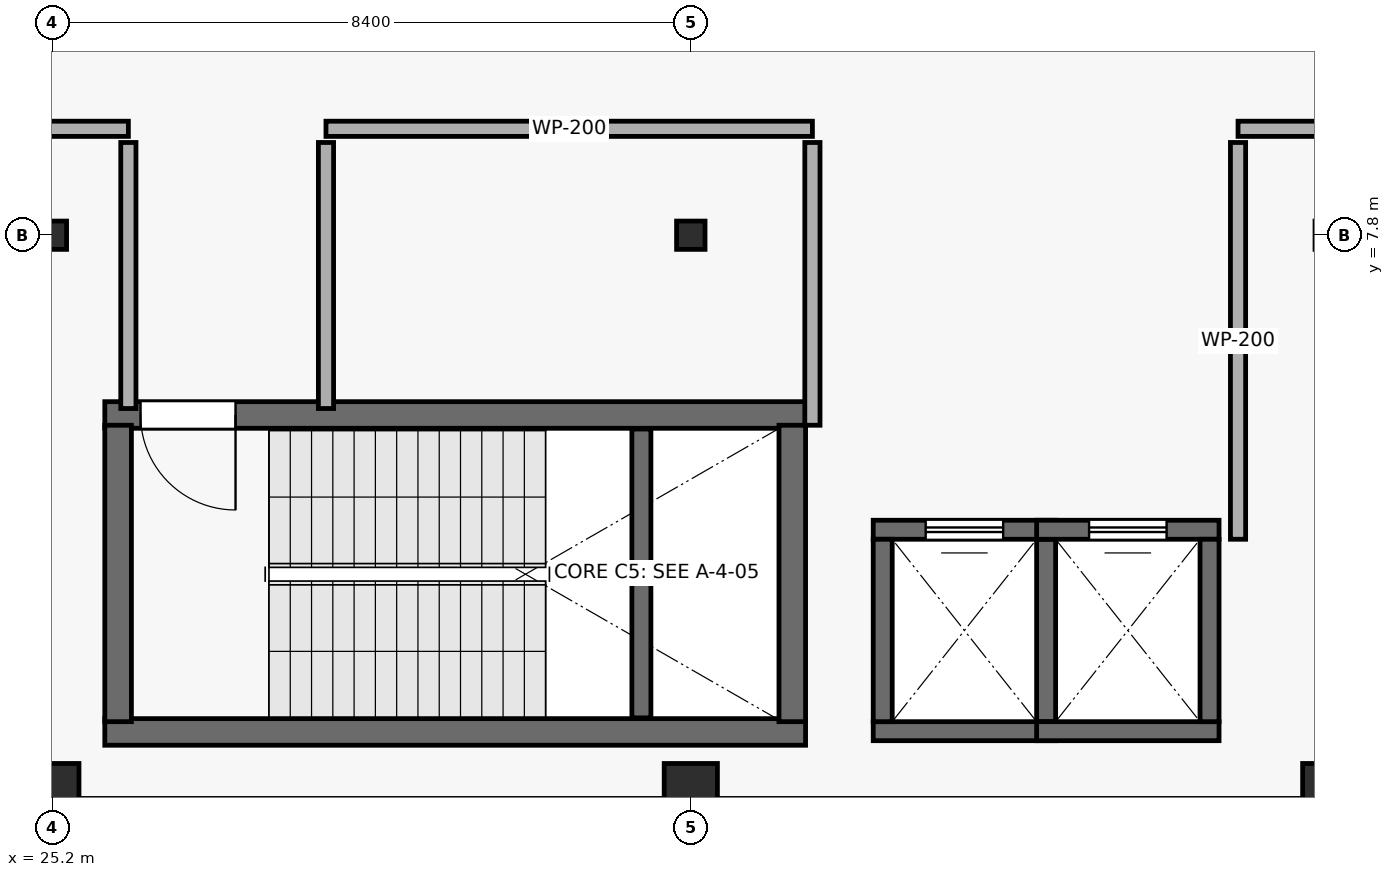
"""IFC4 building model, lengths in metres.
Left out: names, types, materials, properties, quantities, classifications, styles, units other than length and angle.
Written with IfcOpenShell. Run it as: python <this file> out.ifc"""

import sys

from ifc_helpers import new_model, si_unit, direction, frame, frame_2d, origin, origin_2d, place, context, subcontext, project, spatial, rectangle, i_section, extrude, element, fill, save


model = new_model("IFC4")
c1 = context("Model", 3, precision=1e-05, world=origin(), true_north=direction((0.0, 1.0)))
c2 = subcontext(c1, "Body", "Model", "MODEL_VIEW")
j1 = project(units=[si_unit("LENGTHUNIT", "METRE"), si_unit("PLANEANGLEUNIT", "RADIAN")], contexts=[c1])
p1 = place(None, origin())
s1 = spatial("IfcSite", under=j1, at=p1, CompositionType="ELEMENT")
p2 = place(p1, origin())
s2 = spatial("IfcBuilding", under=s1, at=p2, CompositionType="ELEMENT")
p3 = place(p2, frame((0.0, 0.0, 10.2)))
s3 = spatial("IfcBuildingStorey", under=s2, at=p3, CompositionType="ELEMENT", Elevation=10.2)
p4 = place(p3, frame((25.2, 0.5, 0.0), z_axis=(0.0, 0.0, 1.0), x_axis=(1.0, 0.0, 0.0)))
e1 = element("IfcColumn", 1, at=p4, inside=s3, PredefinedType="COLUMN", context=c2, shape_type="SweptSolid", body=[
    extrude(rectangle(XDim=0.7, YDim=0.7, at=origin_2d()), origin(), (0.0, 0.0, 1.0), 5.1),
])
p5 = place(p3, frame((25.2, 7.8, 0.0), z_axis=(0.0, 0.0, 1.0), x_axis=(1.0, 0.0, 0.0)))
e2 = element("IfcColumn", 2, at=p5, inside=s3, PredefinedType="COLUMN", context=c2, shape_type="SweptSolid", body=[
    extrude(i_section(OverallWidth=0.374, OverallDepth=0.372, WebThickness=0.016, FlangeThickness=0.026, at=origin_2d()), origin(), (0.0, 0.0, 1.0), 5.1),
])
p6 = place(p3, frame((33.6, 0.5, 0.0), z_axis=(0.0, 0.0, 1.0), x_axis=(1.0, 0.0, 0.0)))
e3 = element("IfcColumn", 3, at=p6, inside=s3, PredefinedType="COLUMN", context=c2, shape_type="SweptSolid", body=[
    extrude(rectangle(XDim=0.7, YDim=0.7, at=origin_2d()), origin(), (0.0, 0.0, 1.0), 5.1),
])
p7 = place(p3, frame((33.6, 7.8, 0.0), z_axis=(0.0, 0.0, 1.0), x_axis=(1.0, 0.0, 0.0)))
e4 = element("IfcColumn", 4, at=p7, inside=s3, PredefinedType="COLUMN", context=c2, shape_type="SweptSolid", body=[
    extrude(i_section(OverallWidth=0.374, OverallDepth=0.372, WebThickness=0.016, FlangeThickness=0.026, at=origin_2d()), origin(), (0.0, 0.0, 1.0), 5.1),
])
p8 = place(p3, frame((42.0, 0.5, 0.0), z_axis=(0.0, 0.0, 1.0), x_axis=(1.0, 0.0, 0.0)))
e5 = element("IfcColumn", 5, at=p8, inside=s3, PredefinedType="COLUMN", context=c2, shape_type="SweptSolid", body=[
    extrude(rectangle(XDim=0.7, YDim=0.7, at=origin_2d()), origin(), (0.0, 0.0, 1.0), 5.1),
])
p9 = place(p3, frame((25.89, 1.265, 0.0), z_axis=(0.0, 0.0, 1.0), x_axis=(1.0, 0.0, 0.0)))
e6 = element("IfcWall", 6, at=p9, inside=s3, PredefinedType="SHEAR", context=c2, shape_type="SweptSolid", body=[
    extrude(rectangle(XDim=9.22, YDim=0.35, at=frame_2d((4.61, 0.0))), origin(), (0.0, 0.0, 1.0), 4.82),
])
p10 = place(p3, frame((35.11, 5.435, 0.0), z_axis=(0.0, 0.0, 1.0), x_axis=(-1.0, 0.0, 0.0)))
e7 = element("IfcWall", 7, at=p10, inside=s3, PredefinedType="SHEAR", context=c2, shape_type="SweptSolid", body=[
    extrude(rectangle(XDim=9.22, YDim=0.35, at=frame_2d((4.61, 0.0))), origin(), (0.0, 0.0, 1.0), 4.82),
])
p11 = place(p10, frame((7.5, 0.0, 0.0)))
e8 = element("IfcOpeningElement", 8, at=p11, cuts=e7, PredefinedType="OPENING", context=c2, shape_type="SweptSolid", body=[
    extrude(rectangle(XDim=1.25, YDim=2.2, at=frame_2d((0.625, 1.1))), frame((0.0, 0.185, 0.0), z_axis=(0.0, -1.0, 0.0), x_axis=(1.0, 0.0, 0.0)), (0.0, 0.0, 1.0), 0.37),
])
for number, where, z_axis, x_axis in (
    (9, (26.065, 1.4, 0.0), (0.0, 0.0, 1.0), (0.0, 1.0, 0.0)),
    (10, (34.935, 5.3, 0.0), (0.0, 0.0, 1.0), (0.0, -1.0, 0.0)),
):
    element("IfcWall", number, at=place(p3, frame(where, z_axis=z_axis, x_axis=x_axis)), inside=s3, PredefinedType="SHEAR", context=c2, shape_type="SweptSolid", body=[
        extrude(rectangle(XDim=3.9, YDim=0.35, at=frame_2d((1.95, 0.0))), origin(), (0.0, 0.0, 1.0), 4.82),
    ])
p12 = place(p3, frame((32.95, 1.45, 0.0), z_axis=(0.0, 0.0, 1.0), x_axis=(0.0, 1.0, 0.0)))
e11 = element("IfcWall", 11, at=p12, inside=s3, PredefinedType="SHEAR", context=c2, shape_type="SweptSolid", body=[
    extrude(rectangle(XDim=3.8, YDim=0.25, at=frame_2d((1.9, 0.0))), origin(), (0.0, 0.0, 1.0), 2.37),
])
p13 = place(p3, frame((36.0, 1.275, 0.0), z_axis=(0.0, 0.0, 1.0), x_axis=(1.0, 0.0, 0.0)))
e12 = element("IfcWall", 12, at=p13, inside=s3, PredefinedType="SHEAR", context=c2, shape_type="SweptSolid", body=[
    extrude(rectangle(XDim=2.4, YDim=0.25, at=frame_2d((1.2, 0.0))), origin(), (0.0, 0.0, 1.0), 4.82),
])
p14 = place(p3, frame((38.4, 3.925, 0.0), z_axis=(0.0, 0.0, 1.0), x_axis=(-1.0, 0.0, 0.0)))
e13 = element("IfcWall", 13, at=p14, inside=s3, PredefinedType="SHEAR", context=c2, shape_type="SweptSolid", body=[
    extrude(rectangle(XDim=2.4, YDim=0.25, at=frame_2d((1.2, 0.0))), origin(), (0.0, 0.0, 1.0), 4.82),
])
p15 = place(p14, frame((0.69, 0.0, 0.0)))
e14 = element("IfcOpeningElement", 14, at=p15, cuts=e13, PredefinedType="OPENING", context=c2, shape_type="SweptSolid", body=[
    extrude(rectangle(XDim=1.02, YDim=2.15, at=frame_2d((0.51, 1.075))), frame((0.0, 0.135, 0.0), z_axis=(0.0, -1.0, 0.0), x_axis=(1.0, 0.0, 0.0)), (0.0, 0.0, 1.0), 0.27),
])
for number, where, z_axis, x_axis in (
    (15, (36.125, 1.4, 0.0), (0.0, 0.0, 1.0), (0.0, 1.0, 0.0)),
    (16, (38.275, 3.8, 0.0), (0.0, 0.0, 1.0), (0.0, -1.0, 0.0)),
    (17, (38.15, 1.275, 0.0), (0.0, 0.0, 1.0), (1.0, 0.0, 0.0)),
):
    element("IfcWall", number, at=place(p3, frame(where, z_axis=z_axis, x_axis=x_axis)), inside=s3, PredefinedType="SHEAR", context=c2, shape_type="SweptSolid", body=[
        extrude(rectangle(XDim=2.4, YDim=0.25, at=frame_2d((1.2, 0.0))), origin(), (0.0, 0.0, 1.0), 4.82),
    ])
p16 = place(p3, frame((40.55, 3.925, 0.0), z_axis=(0.0, 0.0, 1.0), x_axis=(-1.0, 0.0, 0.0)))
e18 = element("IfcWall", 18, at=p16, inside=s3, PredefinedType="SHEAR", context=c2, shape_type="SweptSolid", body=[
    extrude(rectangle(XDim=2.4, YDim=0.25, at=frame_2d((1.2, 0.0))), origin(), (0.0, 0.0, 1.0), 4.82),
])
p17 = place(p16, frame((0.69, 0.0, 0.0)))
e19 = element("IfcOpeningElement", 19, at=p17, cuts=e18, PredefinedType="OPENING", context=c2, shape_type="SweptSolid", body=[
    extrude(rectangle(XDim=1.02, YDim=2.15, at=frame_2d((0.51, 1.075))), frame((0.0, 0.135, 0.0), z_axis=(0.0, -1.0, 0.0), x_axis=(1.0, 0.0, 0.0)), (0.0, 0.0, 1.0), 0.27),
])
p18 = place(p3, frame((40.425, 3.8, 0.0), z_axis=(0.0, 0.0, 1.0), x_axis=(0.0, -1.0, 0.0)))
e20 = element("IfcWall", 20, at=p18, inside=s3, PredefinedType="SHEAR", context=c2, shape_type="SweptSolid", body=[
    extrude(rectangle(XDim=2.4, YDim=0.25, at=frame_2d((1.2, 0.0))), origin(), (0.0, 0.0, 1.0), 4.82),
])
p19 = place(p3, frame((40.8, 9.2, 0.0), z_axis=(0.0, 0.0, 1.0), x_axis=(1.0, 0.0, 0.0)))
e21 = element("IfcWall", 21, at=p19, inside=s3, PredefinedType="PARTITIONING", context=c2, shape_type="SweptSolid", body=[
    extrude(rectangle(XDim=17.0, YDim=0.2, at=frame_2d((8.5, 0.0))), origin(), (0.0, 0.0, 1.0), 4.82),
])
p20 = place(p3, frame((19.14, 9.2, 0.0), z_axis=(0.0, 0.0, 1.0), x_axis=(1.0, 0.0, 0.0)))
e22 = element("IfcWall", 22, at=p20, inside=s3, PredefinedType="PARTITIONING", context=c2, shape_type="SweptSolid", body=[
    extrude(rectangle(XDim=7.06, YDim=0.2, at=frame_2d((3.53, 0.0))), origin(), (0.0, 0.0, 1.0), 4.82),
])
p21 = place(p20, frame((3.04, 0.0, 0.0)))
e23 = element("IfcOpeningElement", 23, at=p21, cuts=e22, PredefinedType="OPENING", context=c2, shape_type="SweptSolid", body=[
    extrude(rectangle(XDim=0.98, YDim=2.12, at=frame_2d((0.49, 1.06))), frame((0.0, 0.11, 0.0), z_axis=(0.0, -1.0, 0.0), x_axis=(1.0, 0.0, 0.0)), (0.0, 0.0, 1.0), 0.22),
])
p22 = place(p3, frame((28.8, 9.2, 0.0), z_axis=(0.0, 0.0, 1.0), x_axis=(1.0, 0.0, 0.0)))
e24 = element("IfcWall", 24, at=p22, inside=s3, PredefinedType="PARTITIONING", context=c2, shape_type="SweptSolid", body=[
    extrude(rectangle(XDim=6.4, YDim=0.2, at=frame_2d((3.2, 0.0))), origin(), (0.0, 0.0, 1.0), 4.82),
])
p23 = place(p3, frame((40.8, 3.8, 0.0), z_axis=(0.0, 0.0, 1.0), x_axis=(0.0, 1.0, 0.0)))
e25 = element("IfcWall", 25, at=p23, inside=s3, PredefinedType="PARTITIONING", context=c2, shape_type="SweptSolid", body=[
    extrude(rectangle(XDim=5.22, YDim=0.2, at=frame_2d((2.61, 0.0))), origin(), (0.0, 0.0, 1.0), 4.82),
])
p24 = place(p3, frame((35.2, 9.02, 0.0), z_axis=(0.0, 0.0, 1.0), x_axis=(0.0, -1.0, 0.0)))
e26 = element("IfcWall", 26, at=p24, inside=s3, PredefinedType="PARTITIONING", context=c2, shape_type="SweptSolid", body=[
    extrude(rectangle(XDim=3.72, YDim=0.2, at=frame_2d((1.86, 0.0))), origin(), (0.0, 0.0, 1.0), 4.82),
])
for number, where, z_axis, x_axis in (
    (27, (26.2, 9.02, 0.0), (0.0, 0.0, 1.0), (0.0, -1.0, 0.0)),
    (28, (28.8, 5.52, 0.0), (0.0, 0.0, 1.0), (0.0, 1.0, 0.0)),
):
    element("IfcWall", number, at=place(p3, frame(where, z_axis=z_axis, x_axis=x_axis)), inside=s3, PredefinedType="PARTITIONING", context=c2, shape_type="SweptSolid", body=[
        extrude(rectangle(XDim=3.5, YDim=0.2, at=frame_2d((1.75, 0.0))), origin(), (0.0, 0.0, 1.0), 4.82),
    ])
p25 = place(p11, origin())
e29 = element("IfcDoor", 29, at=p25, inside=s3, OperationType="SINGLE_SWING_LEFT", PredefinedType="DOOR", context=c2, shape_type="SweptSolid", body=[
    extrude(rectangle(XDim=1.25, YDim=2.2, at=frame_2d((0.625, 1.1))), frame((0.0, 0.025, 0.0), z_axis=(0.0, -1.0, 0.0), x_axis=(1.0, 0.0, 0.0)), (0.0, 0.0, 1.0), 0.05),
])
fill(e8, e29)
p26 = place(p15, origin())
e30 = element("IfcDoor", 30, at=p26, inside=s3, OperationType="SLIDING_TO_RIGHT", PredefinedType="DOOR", context=c2, shape_type="SweptSolid", body=[
    extrude(rectangle(XDim=1.02, YDim=2.15, at=frame_2d((0.51, 1.075))), frame((0.0, 0.025, 0.0), z_axis=(0.0, -1.0, 0.0), x_axis=(1.0, 0.0, 0.0)), (0.0, 0.0, 1.0), 0.05),
])
fill(e14, e30)
p27 = place(p17, origin())
e31 = element("IfcDoor", 31, at=p27, inside=s3, OperationType="SLIDING_TO_RIGHT", PredefinedType="DOOR", context=c2, shape_type="SweptSolid", body=[
    extrude(rectangle(XDim=1.02, YDim=2.15, at=frame_2d((0.51, 1.075))), frame((0.0, 0.025, 0.0), z_axis=(0.0, -1.0, 0.0), x_axis=(1.0, 0.0, 0.0)), (0.0, 0.0, 1.0), 0.05),
])
fill(e19, e31)
save(model, sys.argv[1])
